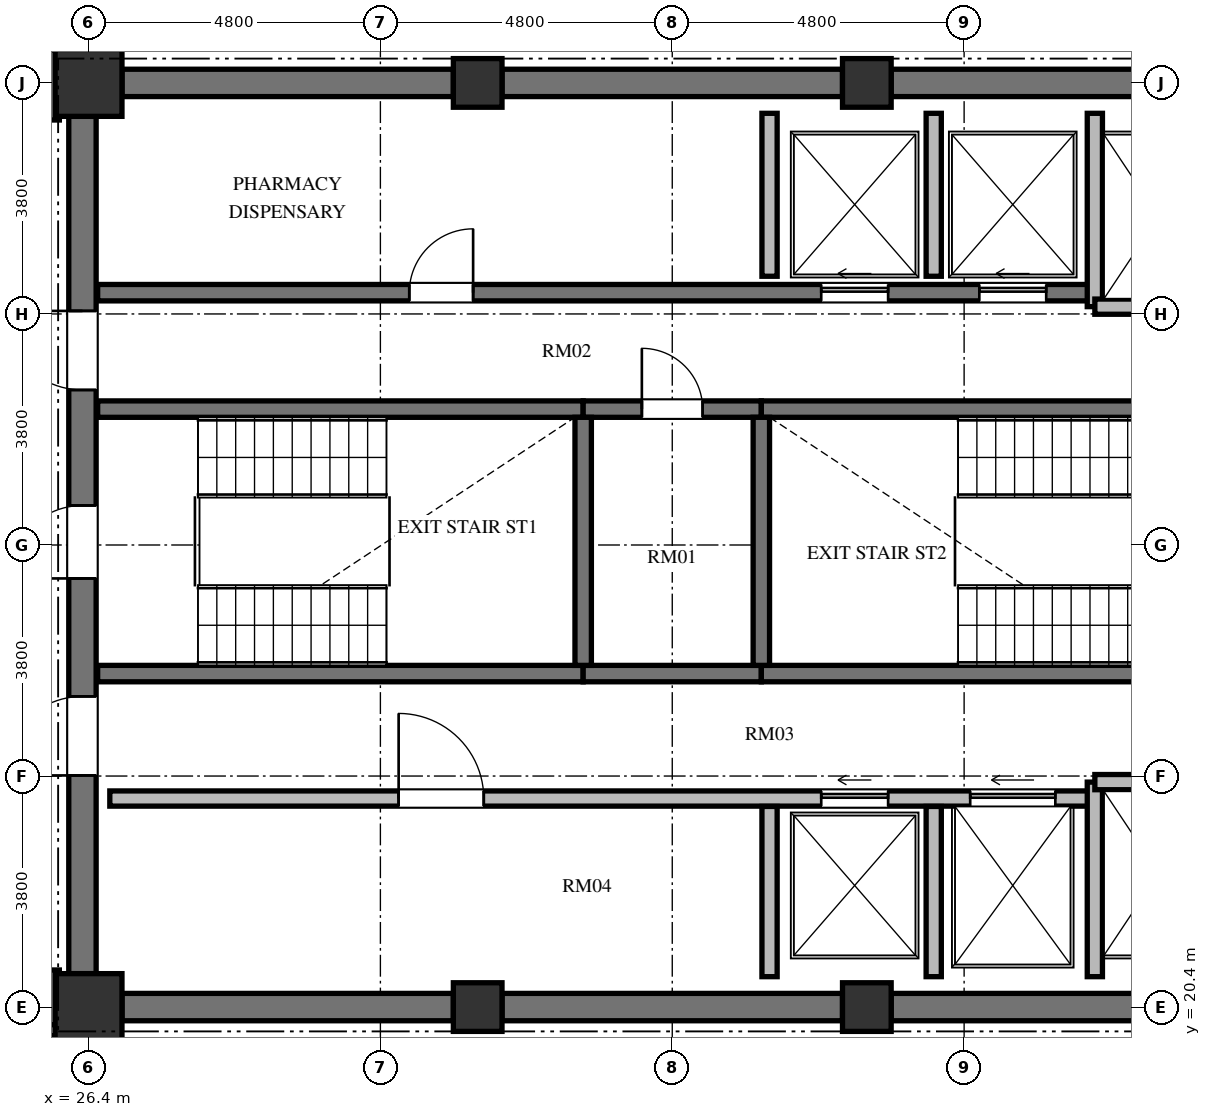
"""IFC4 building model, lengths in metres.
Left out: names, types, materials, properties, quantities, classifications, styles, units other than length and angle.
Written with IfcOpenShell. Run it as: python <this file> out.ifc"""

import sys

from ifc_helpers import new_model, si_unit, direction, frame, frame_2d, origin, origin_2d, place, context, subcontext, project, spatial, rectangle, extrude, element, fill, save


model = new_model("IFC4")
c1 = context("Model", 3, precision=1e-05, world=origin(), true_north=direction((0.0, 1.0)))
c2 = subcontext(c1, "Body", "Model", "MODEL_VIEW")
j1 = project(units=[si_unit("LENGTHUNIT", "METRE"), si_unit("PLANEANGLEUNIT", "RADIAN")], contexts=[c1])
p1 = place(None, origin())
s1 = spatial("IfcSite", under=j1, at=p1, CompositionType="ELEMENT")
p2 = place(p1, origin())
s2 = spatial("IfcBuilding", under=s1, at=p2, CompositionType="ELEMENT")
p3 = place(p2, frame((0.0, 0.0, 242.256)))
s3 = spatial("IfcBuildingStorey", under=s2, at=p3, CompositionType="ELEMENT", Elevation=242.256)
p4 = place(p3, frame((26.4, 20.4, 0.0), z_axis=(0.0, 0.0, 1.0), x_axis=(1.0, 0.0, 0.0)))
e1 = element("IfcColumn", 1, at=p4, inside=s3, PredefinedType="COLUMN", context=c2, shape_type="SweptSolid", body=[
    extrude(rectangle(XDim=1.1, YDim=1.1, at=origin_2d()), origin(), (0.0, 0.0, 1.0), 3.648),
])
for number, where, z_axis, x_axis in (
    (2, (32.8, 20.4, 0.0), (0.0, 0.0, 1.0), (1.0, 0.0, 0.0)),
    (3, (39.2, 20.4, 0.0), (0.0, 0.0, 1.0), (1.0, 0.0, 0.0)),
    (4, (39.2, 35.6, 0.0), (0.0, 0.0, 1.0), (1.0, 0.0, 0.0)),
    (5, (32.8, 35.6, 0.0), (0.0, 0.0, 1.0), (1.0, 0.0, 0.0)),
):
    element("IfcColumn", number, at=place(p3, frame(where, z_axis=z_axis, x_axis=x_axis)), inside=s3, PredefinedType="COLUMN", context=c2, shape_type="SweptSolid", body=[
        extrude(rectangle(XDim=0.8, YDim=0.8, at=origin_2d()), origin(), (0.0, 0.0, 1.0), 3.648),
    ])
p5 = place(p3, frame((26.4, 35.6, 0.0), z_axis=(0.0, 0.0, 1.0), x_axis=(1.0, 0.0, 0.0)))
e6 = element("IfcColumn", 6, at=p5, inside=s3, PredefinedType="COLUMN", context=c2, shape_type="SweptSolid", body=[
    extrude(rectangle(XDim=1.1, YDim=1.1, at=origin_2d()), origin(), (0.0, 0.0, 1.0), 3.648),
])
p6 = place(p3, frame((26.3, 20.95, 0.0), z_axis=(0.0, 0.0, 1.0), x_axis=(0.0, 1.0, 0.0)))
e7 = element("IfcWall", 7, at=p6, inside=s3, PredefinedType="SHEAR", context=c2, shape_type="SweptSolid", body=[
    extrude(rectangle(XDim=14.1, YDim=0.45, at=frame_2d((7.05, 0.0))), origin(), (0.0, 0.0, 1.0), 3.648),
])
p7 = place(p6, frame((6.5, 0.0, 0.0)))
e8 = element("IfcOpeningElement", 8, at=p7, cuts=e7, PredefinedType="OPENING", context=c2, shape_type="SweptSolid", body=[
    extrude(rectangle(XDim=1.2, YDim=2.15, at=frame_2d((0.6, 1.075))), frame((0.0, 0.235, 0.0), z_axis=(0.0, -1.0, 0.0), x_axis=(1.0, 0.0, 0.0)), (0.0, 0.0, 1.0), 0.47),
])
p8 = place(p6, frame((9.6, 0.0, 0.0)))
e9 = element("IfcOpeningElement", 9, at=p8, cuts=e7, PredefinedType="OPENING", context=c2, shape_type="SweptSolid", body=[
    extrude(rectangle(XDim=1.3, YDim=2.2, at=frame_2d((0.65, 1.1))), frame((0.0, 0.235, 0.0), z_axis=(0.0, -1.0, 0.0), x_axis=(1.0, 0.0, 0.0)), (0.0, 0.0, 1.0), 0.47),
])
p9 = place(p6, frame((3.26, 0.0, 0.0)))
e10 = element("IfcOpeningElement", 10, at=p9, cuts=e7, PredefinedType="OPENING", context=c2, shape_type="SweptSolid", body=[
    extrude(rectangle(XDim=1.3, YDim=2.2, at=frame_2d((0.65, 1.1))), frame((0.0, 0.235, 0.0), z_axis=(0.0, -1.0, 0.0), x_axis=(1.0, 0.0, 0.0)), (0.0, 0.0, 1.0), 0.47),
])
for number, where, z_axis, x_axis in (
    (11, (26.95, 20.4, 0.0), (0.0, 0.0, 1.0), (1.0, 0.0, 0.0)),
    (12, (26.95, 35.6, 0.0), (0.0, 0.0, 1.0), (1.0, 0.0, 0.0)),
):
    element("IfcWall", number, at=place(p3, frame(where, z_axis=z_axis, x_axis=x_axis)), inside=s3, PredefinedType="SHEAR", context=c2, shape_type="SweptSolid", body=[
        extrude(rectangle(XDim=5.45, YDim=0.45, at=frame_2d((2.725, 0.0))), origin(), (0.0, 0.0, 1.0), 3.648),
    ])
for number, where, z_axis, x_axis in (
    (13, (33.2, 20.4, 0.0), (0.0, 0.0, 1.0), (1.0, 0.0, 0.0)),
    (14, (33.2, 35.6, 0.0), (0.0, 0.0, 1.0), (1.0, 0.0, 0.0)),
):
    element("IfcWall", number, at=place(p3, frame(where, z_axis=z_axis, x_axis=x_axis)), inside=s3, PredefinedType="SHEAR", context=c2, shape_type="SweptSolid", body=[
        extrude(rectangle(XDim=5.6, YDim=0.45, at=frame_2d((2.8, 0.0))), origin(), (0.0, 0.0, 1.0), 3.648),
    ])
for number, where, z_axis, x_axis in (
    (15, (39.6, 20.4, 0.0), (0.0, 0.0, 1.0), (1.0, 0.0, 0.0)),
    (16, (39.6, 35.6, 0.0), (0.0, 0.0, 1.0), (1.0, 0.0, 0.0)),
):
    element("IfcWall", number, at=place(p3, frame(where, z_axis=z_axis, x_axis=x_axis)), inside=s3, PredefinedType="SHEAR", context=c2, shape_type="SweptSolid", body=[
        extrude(rectangle(XDim=5.45, YDim=0.45, at=frame_2d((2.725, 0.0))), origin(), (0.0, 0.0, 1.0), 3.648),
    ])
p10 = place(p3, frame((26.55, 30.235, 0.0), z_axis=(0.0, 0.0, 1.0), x_axis=(1.0, 0.0, 0.0)))
e17 = element("IfcWall", 17, at=p10, inside=s3, PredefinedType="SHEAR", context=c2, shape_type="SweptSolid", body=[
    extrude(rectangle(XDim=7.985, YDim=0.27, at=frame_2d((3.992, 0.0))), origin(), (0.0, 0.0, 1.0), 3.648),
])
p11 = place(p3, frame((34.535, 30.235, 0.0), z_axis=(0.0, 0.0, 1.0), x_axis=(1.0, 0.0, 0.0)))
e18 = element("IfcWall", 18, at=p11, inside=s3, PredefinedType="SHEAR", context=c2, shape_type="SweptSolid", body=[
    extrude(rectangle(XDim=2.93, YDim=0.27, at=frame_2d((1.465, 0.0))), origin(), (0.0, 0.0, 1.0), 3.648),
])
p12 = place(p11, frame((0.965, 0.0, 0.0)))
e19 = element("IfcOpeningElement", 19, at=p12, cuts=e18, PredefinedType="OPENING", context=c2, shape_type="SweptSolid", body=[
    extrude(rectangle(XDim=1.0, YDim=2.1, at=frame_2d((0.5, 1.05))), frame((0.0, 0.145, 0.0), z_axis=(0.0, -1.0, 0.0), x_axis=(1.0, 0.0, 0.0)), (0.0, 0.0, 1.0), 0.29),
])
p13 = place(p3, frame((37.465, 30.235, 0.0), z_axis=(0.0, 0.0, 1.0), x_axis=(1.0, 0.0, 0.0)))
e20 = element("IfcWall", 20, at=p13, inside=s3, PredefinedType="SHEAR", context=c2, shape_type="SweptSolid", body=[
    extrude(rectangle(XDim=7.985, YDim=0.27, at=frame_2d((3.992, 0.0))), origin(), (0.0, 0.0, 1.0), 3.648),
])
p14 = place(p13, frame((6.455, 0.0, 0.0)))
e21 = element("IfcOpeningElement", 21, at=p14, cuts=e20, PredefinedType="OPENING", context=c2, shape_type="SweptSolid", body=[
    extrude(rectangle(XDim=1.2, YDim=2.15, at=frame_2d((0.6, 1.075))), frame((0.0, 0.145, 0.0), z_axis=(0.0, -1.0, 0.0), x_axis=(1.0, 0.0, 0.0)), (0.0, 0.0, 1.0), 0.29),
])
p15 = place(p3, frame((26.55, 25.885, 0.0), z_axis=(0.0, 0.0, 1.0), x_axis=(1.0, 0.0, 0.0)))
e22 = element("IfcWall", 22, at=p15, inside=s3, PredefinedType="SHEAR", context=c2, shape_type="SweptSolid", body=[
    extrude(rectangle(XDim=7.985, YDim=0.27, at=frame_2d((3.992, 0.0))), origin(), (0.0, 0.0, 1.0), 3.648),
])
p16 = place(p3, frame((34.535, 25.885, 0.0), z_axis=(0.0, 0.0, 1.0), x_axis=(1.0, 0.0, 0.0)))
e23 = element("IfcWall", 23, at=p16, inside=s3, PredefinedType="SHEAR", context=c2, shape_type="SweptSolid", body=[
    extrude(rectangle(XDim=2.93, YDim=0.27, at=frame_2d((1.465, 0.0))), origin(), (0.0, 0.0, 1.0), 3.648),
])
p17 = place(p3, frame((37.465, 25.885, 0.0), z_axis=(0.0, 0.0, 1.0), x_axis=(1.0, 0.0, 0.0)))
e24 = element("IfcWall", 24, at=p17, inside=s3, PredefinedType="SHEAR", context=c2, shape_type="SweptSolid", body=[
    extrude(rectangle(XDim=7.985, YDim=0.27, at=frame_2d((3.992, 0.0))), origin(), (0.0, 0.0, 1.0), 3.648),
])
for number, where, z_axis, x_axis in (
    (25, (34.535, 26.02, 0.0), (0.0, 0.0, 1.0), (0.0, 1.0, 0.0)),
    (26, (37.465, 26.02, 0.0), (0.0, 0.0, 1.0), (0.0, 1.0, 0.0)),
):
    element("IfcWall", number, at=place(p3, frame(where, z_axis=z_axis, x_axis=x_axis)), inside=s3, PredefinedType="SHEAR", context=c2, shape_type="SweptSolid", body=[
        extrude(rectangle(XDim=4.08, YDim=0.27, at=frame_2d((2.04, 0.0))), origin(), (0.0, 0.0, 1.0), 3.648),
    ])
p18 = place(p3, frame((26.55, 32.15, 0.0), z_axis=(0.0, 0.0, 1.0), x_axis=(1.0, 0.0, 0.0)))
e27 = element("IfcWall", 27, at=p18, inside=s3, PredefinedType="SHEAR", context=c2, shape_type="SweptSolid", body=[
    extrude(rectangle(XDim=16.4, YDim=0.27, at=frame_2d((8.2, 0.0))), origin(), (0.0, 0.0, 1.0), 3.648),
])
p19 = place(p18, frame((5.125, 0.0, 0.0)))
e28 = element("IfcOpeningElement", 28, at=p19, cuts=e27, PredefinedType="OPENING", context=c2, shape_type="SweptSolid", body=[
    extrude(rectangle(XDim=1.05, YDim=2.15, at=frame_2d((0.525, 1.075))), frame((0.0, 0.145, 0.0), z_axis=(0.0, -1.0, 0.0), x_axis=(1.0, 0.0, 0.0)), (0.0, 0.0, 1.0), 0.29),
])
p20 = place(p18, frame((11.9, 0.0, 0.0)))
e29 = element("IfcOpeningElement", 29, at=p20, cuts=e27, PredefinedType="OPENING", context=c2, shape_type="SweptSolid", body=[
    extrude(rectangle(XDim=1.1, YDim=2.2, at=frame_2d((0.55, 1.1))), frame((0.0, 0.145, 0.0), z_axis=(0.0, -1.0, 0.0), x_axis=(1.0, 0.0, 0.0)), (0.0, 0.0, 1.0), 0.29),
])
p21 = place(p18, frame((14.5, 0.0, 0.0)))
e30 = element("IfcOpeningElement", 30, at=p21, cuts=e27, PredefinedType="OPENING", context=c2, shape_type="SweptSolid", body=[
    extrude(rectangle(XDim=1.1, YDim=2.2, at=frame_2d((0.55, 1.1))), frame((0.0, 0.145, 0.0), z_axis=(0.0, -1.0, 0.0), x_axis=(1.0, 0.0, 0.0)), (0.0, 0.0, 1.0), 0.29),
])
p22 = place(p3, frame((26.75, 23.83, 0.0), z_axis=(0.0, 0.0, 1.0), x_axis=(1.0, 0.0, 0.0)))
e31 = element("IfcWall", 31, at=p22, inside=s3, PredefinedType="SOLIDWALL", context=c2, shape_type="SweptSolid", body=[
    extrude(rectangle(XDim=16.2, YDim=0.25, at=frame_2d((8.1, 0.0))), origin(), (0.0, 0.0, 1.0), 3.198),
])
p23 = place(p22, frame((4.75, 0.0, 0.0)))
e32 = element("IfcOpeningElement", 32, at=p23, cuts=e31, PredefinedType="OPENING", context=c2, shape_type="SweptSolid", body=[
    extrude(rectangle(XDim=1.4, YDim=2.2, at=frame_2d((0.7, 1.1))), frame((0.0, 0.135, 0.0), z_axis=(0.0, -1.0, 0.0), x_axis=(1.0, 0.0, 0.0)), (0.0, 0.0, 1.0), 0.27),
])
p24 = place(p22, frame((11.7, 0.0, 0.0)))
e33 = element("IfcOpeningElement", 33, at=p24, cuts=e31, PredefinedType="OPENING", context=c2, shape_type="SweptSolid", body=[
    extrude(rectangle(XDim=1.1, YDim=2.2, at=frame_2d((0.55, 1.1))), frame((0.0, 0.135, 0.0), z_axis=(0.0, -1.0, 0.0), x_axis=(1.0, 0.0, 0.0)), (0.0, 0.0, 1.0), 0.27),
])
p25 = place(p22, frame((14.15, 0.0, 0.0)))
e34 = element("IfcOpeningElement", 34, at=p25, cuts=e31, PredefinedType="OPENING", context=c2, shape_type="SweptSolid", body=[
    extrude(rectangle(XDim=1.4, YDim=2.3, at=frame_2d((0.7, 1.15))), frame((0.0, 0.135, 0.0), z_axis=(0.0, -1.0, 0.0), x_axis=(1.0, 0.0, 0.0)), (0.0, 0.0, 1.0), 0.27),
])
p26 = place(p3, frame((42.95, 31.92, 0.0), z_axis=(0.0, 0.0, 1.0), x_axis=(0.0, 1.0, 0.0)))
e35 = element("IfcWall", 35, at=p26, inside=s3, PredefinedType="SOLIDWALL", context=c2, shape_type="SweptSolid", body=[
    extrude(rectangle(XDim=3.18, YDim=0.25, at=frame_2d((1.59, 0.0))), origin(), (0.0, 0.0, 1.0), 3.198),
])
p27 = place(p3, frame((42.95, 31.92, 0.0), z_axis=(0.0, 0.0, 1.0), x_axis=(1.0, 0.0, 0.0)))
e36 = element("IfcWall", 36, at=p27, inside=s3, PredefinedType="SOLIDWALL", context=c2, shape_type="SweptSolid", body=[
    extrude(rectangle(XDim=2.3, YDim=0.25, at=frame_2d((1.15, 0.0))), origin(), (0.0, 0.0, 1.0), 3.198),
])
p28 = place(p3, frame((42.95, 20.9, 0.0), z_axis=(0.0, 0.0, 1.0), x_axis=(0.0, 1.0, 0.0)))
e37 = element("IfcWall", 37, at=p28, inside=s3, PredefinedType="SOLIDWALL", context=c2, shape_type="SweptSolid", body=[
    extrude(rectangle(XDim=3.2, YDim=0.25, at=frame_2d((1.6, 0.0))), origin(), (0.0, 0.0, 1.0), 3.198),
])
p29 = place(p3, frame((42.95, 24.1, 0.0), z_axis=(0.0, 0.0, 1.0), x_axis=(1.0, 0.0, 0.0)))
e38 = element("IfcWall", 38, at=p29, inside=s3, PredefinedType="SOLIDWALL", context=c2, shape_type="SweptSolid", body=[
    extrude(rectangle(XDim=2.3, YDim=0.25, at=frame_2d((1.15, 0.0))), origin(), (0.0, 0.0, 1.0), 3.198),
])
p30 = place(p3, frame((37.6, 32.42, 0.0), z_axis=(0.0, 0.0, 1.0), x_axis=(0.0, 1.0, 0.0)))
e39 = element("IfcWall", 39, at=p30, inside=s3, PredefinedType="SOLIDWALL", context=c2, shape_type="SweptSolid", body=[
    extrude(rectangle(XDim=2.68, YDim=0.25, at=frame_2d((1.34, 0.0))), origin(), (0.0, 0.0, 1.0), 3.198),
])
p31 = place(p3, frame((37.6, 20.9, 0.0), z_axis=(0.0, 0.0, 1.0), x_axis=(0.0, 1.0, 0.0)))
e40 = element("IfcWall", 40, at=p31, inside=s3, PredefinedType="SOLIDWALL", context=c2, shape_type="SweptSolid", body=[
    extrude(rectangle(XDim=2.8, YDim=0.25, at=frame_2d((1.4, 0.0))), origin(), (0.0, 0.0, 1.0), 3.198),
])
p32 = place(p3, frame((40.3, 32.42, 0.0), z_axis=(0.0, 0.0, 1.0), x_axis=(0.0, 1.0, 0.0)))
e41 = element("IfcWall", 41, at=p32, inside=s3, PredefinedType="SOLIDWALL", context=c2, shape_type="SweptSolid", body=[
    extrude(rectangle(XDim=2.68, YDim=0.25, at=frame_2d((1.34, 0.0))), origin(), (0.0, 0.0, 1.0), 3.198),
])
p33 = place(p3, frame((40.3, 20.9, 0.0), z_axis=(0.0, 0.0, 1.0), x_axis=(0.0, 1.0, 0.0)))
e42 = element("IfcWall", 42, at=p33, inside=s3, PredefinedType="SOLIDWALL", context=c2, shape_type="SweptSolid", body=[
    extrude(rectangle(XDim=2.8, YDim=0.25, at=frame_2d((1.4, 0.0))), origin(), (0.0, 0.0, 1.0), 3.198),
])
p34 = place(p3, frame((25.83, 36.14, 0.0), z_axis=(0.0, 0.0, 1.0), x_axis=(0.0, -1.0, 0.0)))
e43 = element("IfcWall", 43, at=p34, inside=s3, PredefinedType="PARTITIONING", context=c2, shape_type="SweptSolid", body=[
    extrude(rectangle(XDim=1.15, YDim=0.18, at=frame_2d((0.575, 0.0))), origin(), (0.0, 0.0, 1.0), 3.198),
])
p35 = place(p3, frame((25.83, 21.01, 0.0), z_axis=(0.0, 0.0, 1.0), x_axis=(0.0, -1.0, 0.0)))
e44 = element("IfcWall", 44, at=p35, inside=s3, PredefinedType="PARTITIONING", context=c2, shape_type="SweptSolid", body=[
    extrude(rectangle(XDim=1.03, YDim=0.18, at=frame_2d((0.515, 0.0))), origin(), (0.0, 0.0, 1.0), 3.198),
])
p36 = place(p3, frame((25.87, 20.02, 0.0), z_axis=(0.0, 0.0, 1.0), x_axis=(-1.0, 0.0, 0.0)))
e45 = element("IfcWall", 45, at=p36, inside=s3, PredefinedType="PARTITIONING", context=c2, shape_type="SweptSolid", body=[
    extrude(rectangle(XDim=2.56, YDim=0.18, at=frame_2d((1.28, 0.0))), origin(), (0.0, 0.0, 1.0), 3.198),
])
p37 = place(p7, origin())
e46 = element("IfcDoor", 46, at=p37, inside=s3, OperationType="SINGLE_SWING_LEFT", PredefinedType="DOOR", context=c2, shape_type="SweptSolid", body=[
    extrude(rectangle(XDim=1.2, YDim=2.15, at=frame_2d((0.6, 1.075))), frame((0.0, 0.025, 0.0), z_axis=(0.0, -1.0, 0.0), x_axis=(1.0, 0.0, 0.0)), (0.0, 0.0, 1.0), 0.05),
])
fill(e8, e46)
p38 = place(p12, origin())
e47 = element("IfcDoor", 47, at=p38, inside=s3, OperationType="SINGLE_SWING_LEFT", PredefinedType="DOOR", context=c2, shape_type="SweptSolid", body=[
    extrude(rectangle(XDim=1.0, YDim=2.1, at=frame_2d((0.5, 1.05))), frame((0.0, 0.025, 0.0), z_axis=(0.0, -1.0, 0.0), x_axis=(1.0, 0.0, 0.0)), (0.0, 0.0, 1.0), 0.05),
])
fill(e19, e47)
p39 = place(p8, origin())
e48 = element("IfcDoor", 48, at=p39, inside=s3, OperationType="SINGLE_SWING_RIGHT", PredefinedType="DOOR", context=c2, shape_type="SweptSolid", body=[
    extrude(rectangle(XDim=1.3, YDim=2.2, at=frame_2d((0.65, 1.1))), frame((0.0, 0.025, 0.0), z_axis=(0.0, -1.0, 0.0), x_axis=(1.0, 0.0, 0.0)), (0.0, 0.0, 1.0), 0.05),
])
fill(e9, e48)
p40 = place(p9, origin())
e49 = element("IfcDoor", 49, at=p40, inside=s3, OperationType="SINGLE_SWING_LEFT", PredefinedType="DOOR", context=c2, shape_type="SweptSolid", body=[
    extrude(rectangle(XDim=1.3, YDim=2.2, at=frame_2d((0.65, 1.1))), frame((0.0, 0.025, 0.0), z_axis=(0.0, -1.0, 0.0), x_axis=(1.0, 0.0, 0.0)), (0.0, 0.0, 1.0), 0.05),
])
fill(e10, e49)
p41 = place(p19, origin())
e50 = element("IfcDoor", 50, at=p41, inside=s3, OperationType="SINGLE_SWING_RIGHT", PredefinedType="DOOR", context=c2, shape_type="SweptSolid", body=[
    extrude(rectangle(XDim=1.05, YDim=2.15, at=frame_2d((0.525, 1.075))), frame((0.0, 0.025, 0.0), z_axis=(0.0, -1.0, 0.0), x_axis=(1.0, 0.0, 0.0)), (0.0, 0.0, 1.0), 0.05),
])
fill(e28, e50)
p42 = place(p23, origin())
e51 = element("IfcDoor", 51, at=p42, inside=s3, OperationType="SINGLE_SWING_LEFT", PredefinedType="DOOR", context=c2, shape_type="SweptSolid", body=[
    extrude(rectangle(XDim=1.4, YDim=2.2, at=frame_2d((0.7, 1.1))), frame((0.0, 0.025, 0.0), z_axis=(0.0, -1.0, 0.0), x_axis=(1.0, 0.0, 0.0)), (0.0, 0.0, 1.0), 0.05),
])
fill(e32, e51)
p43 = place(p20, origin())
e52 = element("IfcDoor", 52, at=p43, inside=s3, OperationType="SLIDING_TO_LEFT", PredefinedType="DOOR", context=c2, shape_type="SweptSolid", body=[
    extrude(rectangle(XDim=1.1, YDim=2.2, at=frame_2d((0.55, 1.1))), frame((0.0, 0.025, 0.0), z_axis=(0.0, -1.0, 0.0), x_axis=(1.0, 0.0, 0.0)), (0.0, 0.0, 1.0), 0.05),
])
fill(e29, e52)
p44 = place(p21, origin())
e53 = element("IfcDoor", 53, at=p44, inside=s3, OperationType="SLIDING_TO_LEFT", PredefinedType="DOOR", context=c2, shape_type="SweptSolid", body=[
    extrude(rectangle(XDim=1.1, YDim=2.2, at=frame_2d((0.55, 1.1))), frame((0.0, 0.025, 0.0), z_axis=(0.0, -1.0, 0.0), x_axis=(1.0, 0.0, 0.0)), (0.0, 0.0, 1.0), 0.05),
])
fill(e30, e53)
p45 = place(p24, origin())
e54 = element("IfcDoor", 54, at=p45, inside=s3, OperationType="SLIDING_TO_LEFT", PredefinedType="DOOR", context=c2, shape_type="SweptSolid", body=[
    extrude(rectangle(XDim=1.1, YDim=2.2, at=frame_2d((0.55, 1.1))), frame((0.0, 0.025, 0.0), z_axis=(0.0, -1.0, 0.0), x_axis=(1.0, 0.0, 0.0)), (0.0, 0.0, 1.0), 0.05),
])
fill(e33, e54)
p46 = place(p25, origin())
e55 = element("IfcDoor", 55, at=p46, inside=s3, OperationType="SLIDING_TO_LEFT", PredefinedType="DOOR", context=c2, shape_type="SweptSolid", body=[
    extrude(rectangle(XDim=1.4, YDim=2.3, at=frame_2d((0.7, 1.15))), frame((0.0, 0.025, 0.0), z_axis=(0.0, -1.0, 0.0), x_axis=(1.0, 0.0, 0.0)), (0.0, 0.0, 1.0), 0.05),
])
fill(e34, e55)
save(model, sys.argv[1])
